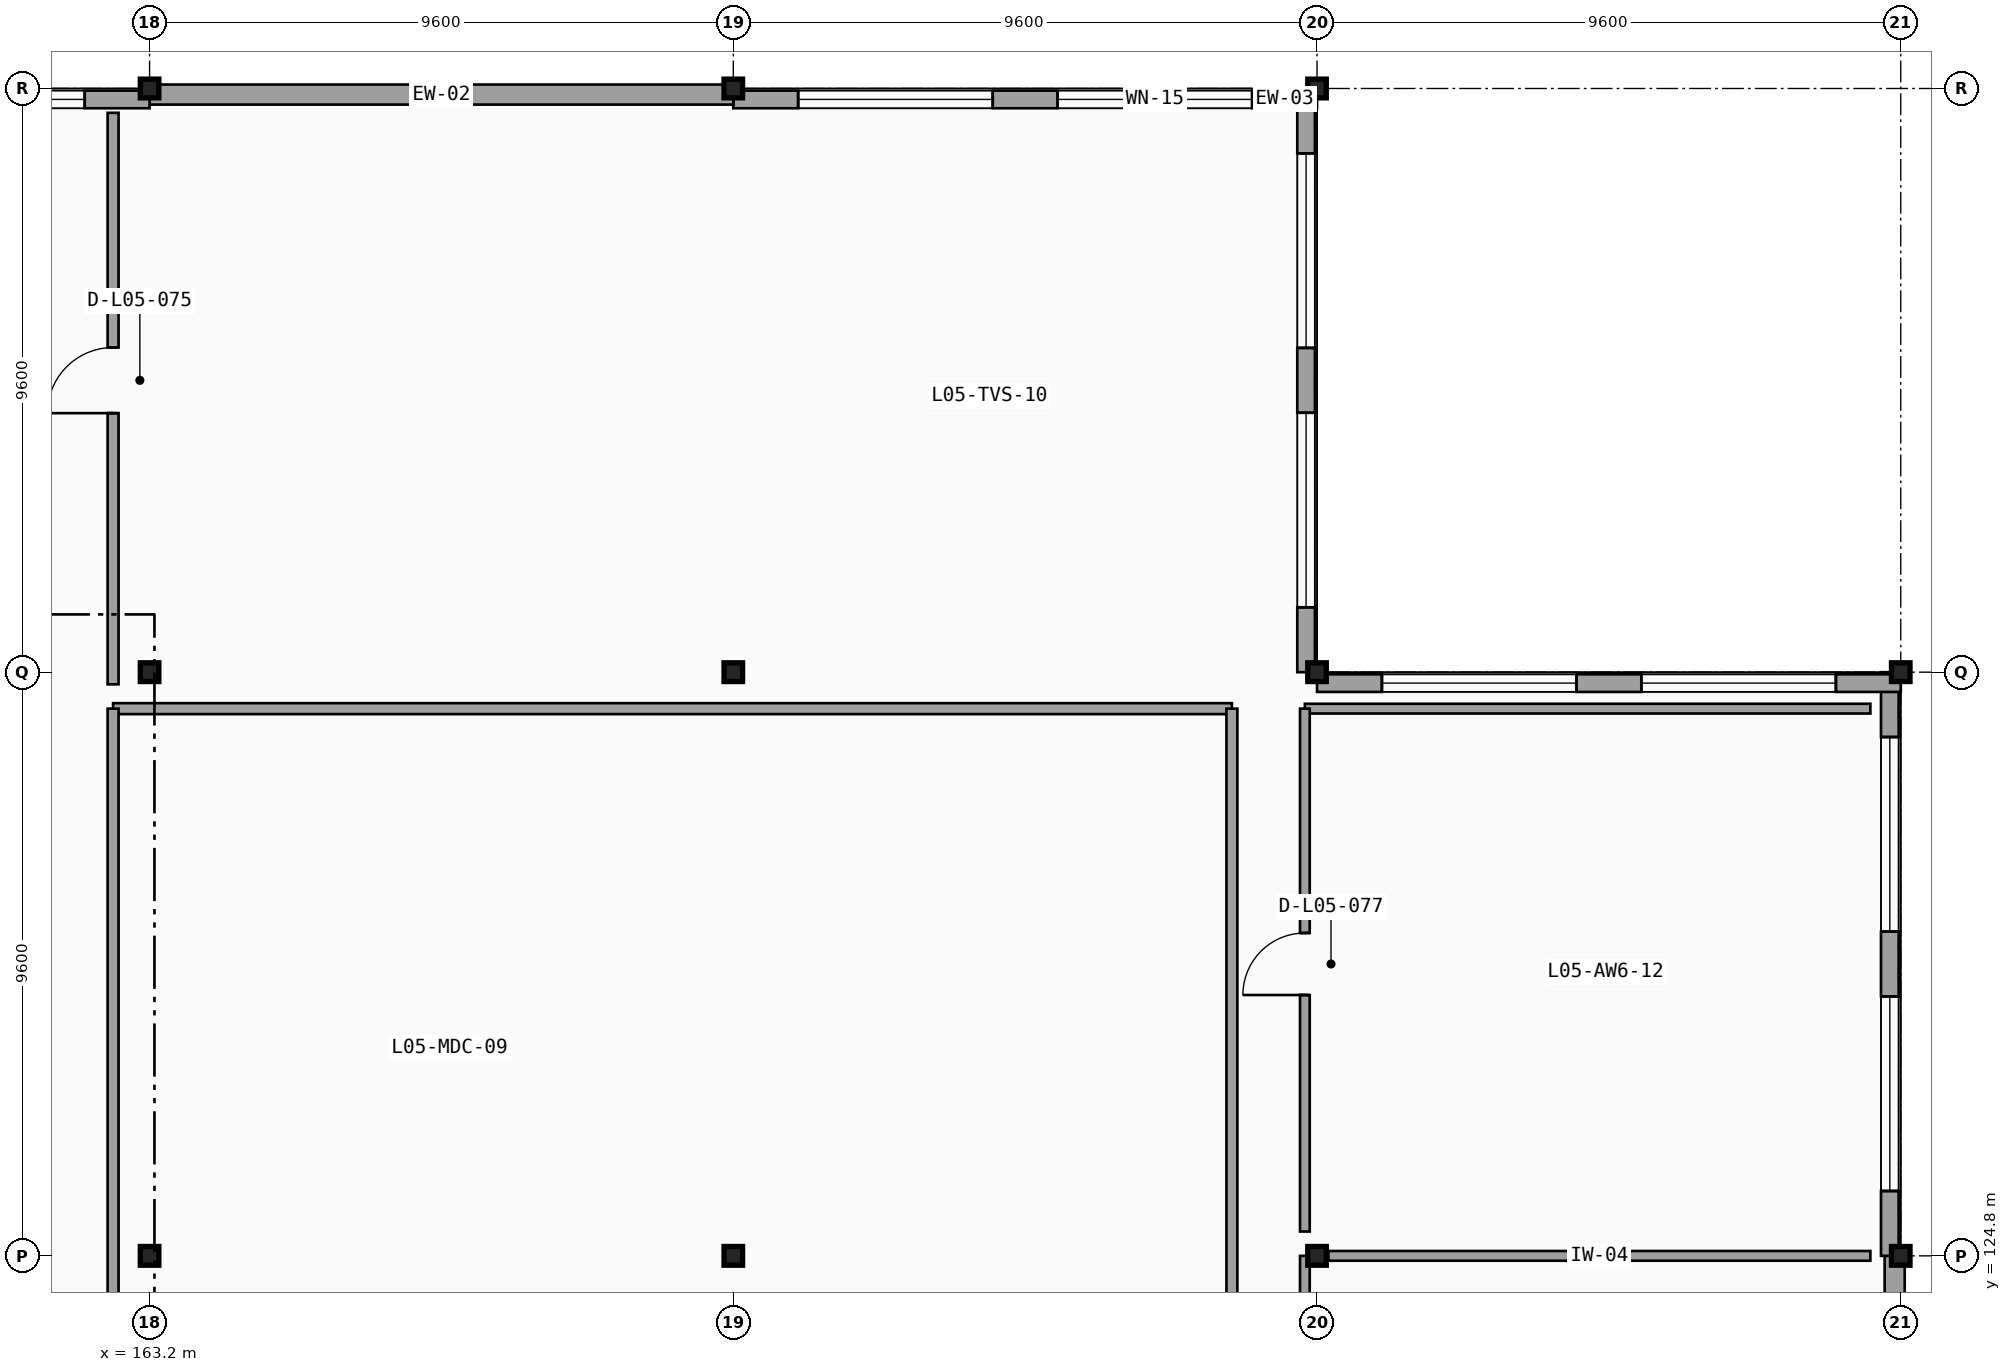
"""IFC4 building model, lengths in metres.
Left out: names, types, materials, properties, quantities, classifications, styles, units other than length and angle.
Written with IfcOpenShell. Run it as: python <this file> out.ifc"""

import sys

from ifc_helpers import new_model, si_unit, direction, frame, frame_2d, origin, origin_2d, place, context, subcontext, project, spatial, rectangle, i_section, extrude, element, fill, save


model = new_model("IFC4")
c1 = context("Model", 3, precision=1e-05, world=origin(), true_north=direction((0.0, 1.0)))
c2 = subcontext(c1, "Body", "Model", "MODEL_VIEW")
j1 = project(units=[si_unit("LENGTHUNIT", "METRE"), si_unit("PLANEANGLEUNIT", "RADIAN")], contexts=[c1])
p1 = place(None, origin())
s1 = spatial("IfcSite", under=j1, at=p1, CompositionType="ELEMENT")
p2 = place(p1, origin())
s2 = spatial("IfcBuilding", under=s1, at=p2, CompositionType="ELEMENT")
p3 = place(p2, frame((0.0, 0.0, 23.1)))
s3 = spatial("IfcBuildingStorey", under=s2, at=p3, CompositionType="ELEMENT", Elevation=23.1)
for number, where, z_axis, x_axis in (
    (1, (163.2, 124.8, 0.0), (0.0, 0.0, 1.0), (1.0, 0.0, 0.0)),
    (2, (163.2, 134.4, 0.0), (0.0, 0.0, 1.0), (1.0, 0.0, 0.0)),
    (3, (163.2, 144.0, 0.0), (0.0, 0.0, 1.0), (1.0, 0.0, 0.0)),
    (4, (172.8, 124.8, 0.0), (0.0, 0.0, 1.0), (1.0, 0.0, 0.0)),
    (5, (172.8, 134.4, 0.0), (0.0, 0.0, 1.0), (1.0, 0.0, 0.0)),
    (6, (172.8, 144.0, 0.0), (0.0, 0.0, 1.0), (1.0, 0.0, 0.0)),
    (7, (182.4, 124.8, 0.0), (0.0, 0.0, 1.0), (1.0, 0.0, 0.0)),
    (8, (182.4, 134.4, 0.0), (0.0, 0.0, 1.0), (1.0, 0.0, 0.0)),
    (9, (182.4, 144.0, 0.0), (0.0, 0.0, 1.0), (1.0, 0.0, 0.0)),
    (10, (192.0, 124.8, 0.0), (0.0, 0.0, 1.0), (1.0, 0.0, 0.0)),
    (11, (192.0, 134.4, 0.0), (0.0, 0.0, 1.0), (1.0, 0.0, 0.0)),
):
    element("IfcColumn", number, at=place(p3, frame(where, z_axis=z_axis, x_axis=x_axis)), inside=s3, PredefinedType="COLUMN", context=c2, shape_type="SweptSolid", body=[
        extrude(i_section(OverallWidth=0.305, OverallDepth=0.308, WebThickness=0.01, FlangeThickness=0.015, FilletRadius=0.013, at=origin_2d()), origin(), (0.0, 0.0, 1.0), 5.1),
    ])
p4 = place(p3, frame((182.4, 143.82, 0.0), z_axis=(0.0, 0.0, 1.0), x_axis=(-1.0, 0.0, 0.0)))
e12 = element("IfcWall", 12, at=p4, inside=s3, PredefinedType="SOLIDWALL", context=c2, shape_type="SweptSolid", body=[
    extrude(rectangle(XDim=9.6, YDim=0.29, at=frame_2d((4.8, 0.0))), origin(), (0.0, 0.0, 1.0), 3.906),
])
p5 = place(p4, frame((4.267, 0.0, 0.95), z_axis=(0.0, 0.0, 1.0), x_axis=(-1.0, 0.0, 0.0)))
e13 = element("IfcOpeningElement", 13, at=p5, cuts=e12, PredefinedType="OPENING", context=c2, shape_type="SweptSolid", body=[
    extrude(rectangle(XDim=3.2, YDim=2.2, at=frame_2d((1.6, 1.1))), frame((0.0, 0.155, 0.0), z_axis=(0.0, -1.0, 0.0), x_axis=(1.0, 0.0, 0.0)), (0.0, 0.0, 1.0), 0.31),
])
p6 = place(p4, frame((8.533, 0.0, 0.95), z_axis=(0.0, 0.0, 1.0), x_axis=(-1.0, 0.0, 0.0)))
e14 = element("IfcOpeningElement", 14, at=p6, cuts=e12, PredefinedType="OPENING", context=c2, shape_type="SweptSolid", body=[
    extrude(rectangle(XDim=3.2, YDim=2.2, at=frame_2d((1.6, 1.1))), frame((0.0, 0.155, 0.0), z_axis=(0.0, -1.0, 0.0), x_axis=(1.0, 0.0, 0.0)), (0.0, 0.0, 1.0), 0.31),
])
p7 = place(p3, frame((172.8, 143.9, 0.0), z_axis=(0.0, 0.0, 1.0), x_axis=(-1.0, 0.0, 0.0)))
e15 = element("IfcWall", 15, at=p7, inside=s3, PredefinedType="SOLIDWALL", context=c2, shape_type="SweptSolid", body=[
    extrude(rectangle(XDim=9.6, YDim=0.33, at=frame_2d((4.8, 0.0))), origin(), (0.0, 0.0, 1.0), 3.893),
])
p8 = place(p3, frame((163.2, 143.82, 0.0), z_axis=(0.0, 0.0, 1.0), x_axis=(-1.0, 0.0, 0.0)))
e16 = element("IfcWall", 16, at=p8, inside=s3, PredefinedType="SOLIDWALL", context=c2, shape_type="SweptSolid", body=[
    extrude(rectangle(XDim=9.6, YDim=0.29, at=frame_2d((4.8, 0.0))), origin(), (0.0, 0.0, 1.0), 3.893),
])
p9 = place(p8, frame((4.267, 0.0, 0.95), z_axis=(0.0, 0.0, 1.0), x_axis=(-1.0, 0.0, 0.0)))
e17 = element("IfcOpeningElement", 17, at=p9, cuts=e16, PredefinedType="OPENING", context=c2, shape_type="SweptSolid", body=[
    extrude(rectangle(XDim=3.2, YDim=2.2, at=frame_2d((1.6, 1.1))), frame((0.0, 0.155, 0.0), z_axis=(0.0, -1.0, 0.0), x_axis=(1.0, 0.0, 0.0)), (0.0, 0.0, 1.0), 0.31),
])
p10 = place(p8, frame((8.533, 0.0, 0.95), z_axis=(0.0, 0.0, 1.0), x_axis=(-1.0, 0.0, 0.0)))
e18 = element("IfcOpeningElement", 18, at=p10, cuts=e16, PredefinedType="OPENING", context=c2, shape_type="SweptSolid", body=[
    extrude(rectangle(XDim=3.2, YDim=2.2, at=frame_2d((1.6, 1.1))), frame((0.0, 0.155, 0.0), z_axis=(0.0, -1.0, 0.0), x_axis=(1.0, 0.0, 0.0)), (0.0, 0.0, 1.0), 0.31),
])
p11 = place(p3, frame((191.9, 115.2, 0.0), z_axis=(0.0, 0.0, 1.0), x_axis=(0.0, 1.0, 0.0)))
e19 = element("IfcWall", 19, at=p11, inside=s3, PredefinedType="SOLIDWALL", context=c2, shape_type="SweptSolid", body=[
    extrude(rectangle(XDim=9.6, YDim=0.33, at=frame_2d((4.8, 0.0))), origin(), (0.0, 0.0, 1.0), 3.893),
])
p12 = place(p3, frame((191.82, 124.8, 0.0), z_axis=(0.0, 0.0, 1.0), x_axis=(0.0, 1.0, 0.0)))
e20 = element("IfcWall", 20, at=p12, inside=s3, PredefinedType="SOLIDWALL", context=c2, shape_type="SweptSolid", body=[
    extrude(rectangle(XDim=9.6, YDim=0.29, at=frame_2d((4.8, 0.0))), origin(), (0.0, 0.0, 1.0), 3.906),
])
p13 = place(p12, frame((4.267, 0.0, 0.95), z_axis=(0.0, 0.0, 1.0), x_axis=(-1.0, 0.0, 0.0)))
e21 = element("IfcOpeningElement", 21, at=p13, cuts=e20, PredefinedType="OPENING", context=c2, shape_type="SweptSolid", body=[
    extrude(rectangle(XDim=3.2, YDim=2.2, at=frame_2d((1.6, 1.1))), frame((0.0, 0.155, 0.0), z_axis=(0.0, -1.0, 0.0), x_axis=(1.0, 0.0, 0.0)), (0.0, 0.0, 1.0), 0.31),
])
p14 = place(p12, frame((8.533, 0.0, 0.95), z_axis=(0.0, 0.0, 1.0), x_axis=(-1.0, 0.0, 0.0)))
e22 = element("IfcOpeningElement", 22, at=p14, cuts=e20, PredefinedType="OPENING", context=c2, shape_type="SweptSolid", body=[
    extrude(rectangle(XDim=3.2, YDim=2.2, at=frame_2d((1.6, 1.1))), frame((0.0, 0.155, 0.0), z_axis=(0.0, -1.0, 0.0), x_axis=(1.0, 0.0, 0.0)), (0.0, 0.0, 1.0), 0.31),
])
p15 = place(p3, frame((192.0, 134.22, 0.0), z_axis=(0.0, 0.0, 1.0), x_axis=(-1.0, 0.0, 0.0)))
e23 = element("IfcWall", 23, at=p15, inside=s3, PredefinedType="SOLIDWALL", context=c2, shape_type="SweptSolid", body=[
    extrude(rectangle(XDim=9.6, YDim=0.29, at=frame_2d((4.8, 0.0))), origin(), (0.0, 0.0, 1.0), 3.906),
])
p16 = place(p15, frame((4.267, 0.0, 0.95), z_axis=(0.0, 0.0, 1.0), x_axis=(-1.0, 0.0, 0.0)))
e24 = element("IfcOpeningElement", 24, at=p16, cuts=e23, PredefinedType="OPENING", context=c2, shape_type="SweptSolid", body=[
    extrude(rectangle(XDim=3.2, YDim=2.2, at=frame_2d((1.6, 1.1))), frame((0.0, 0.155, 0.0), z_axis=(0.0, -1.0, 0.0), x_axis=(1.0, 0.0, 0.0)), (0.0, 0.0, 1.0), 0.31),
])
p17 = place(p15, frame((8.533, 0.0, 0.95), z_axis=(0.0, 0.0, 1.0), x_axis=(-1.0, 0.0, 0.0)))
e25 = element("IfcOpeningElement", 25, at=p17, cuts=e23, PredefinedType="OPENING", context=c2, shape_type="SweptSolid", body=[
    extrude(rectangle(XDim=3.2, YDim=2.2, at=frame_2d((1.6, 1.1))), frame((0.0, 0.155, 0.0), z_axis=(0.0, -1.0, 0.0), x_axis=(1.0, 0.0, 0.0)), (0.0, 0.0, 1.0), 0.31),
])
p18 = place(p3, frame((182.22, 134.4, 0.0), z_axis=(0.0, 0.0, 1.0), x_axis=(0.0, 1.0, 0.0)))
e26 = element("IfcWall", 26, at=p18, inside=s3, PredefinedType="SOLIDWALL", context=c2, shape_type="SweptSolid", body=[
    extrude(rectangle(XDim=9.6, YDim=0.29, at=frame_2d((4.8, 0.0))), origin(), (0.0, 0.0, 1.0), 3.906),
])
p19 = place(p18, frame((4.267, 0.0, 0.95), z_axis=(0.0, 0.0, 1.0), x_axis=(-1.0, 0.0, 0.0)))
e27 = element("IfcOpeningElement", 27, at=p19, cuts=e26, PredefinedType="OPENING", context=c2, shape_type="SweptSolid", body=[
    extrude(rectangle(XDim=3.2, YDim=2.2, at=frame_2d((1.6, 1.1))), frame((0.0, 0.155, 0.0), z_axis=(0.0, -1.0, 0.0), x_axis=(1.0, 0.0, 0.0)), (0.0, 0.0, 1.0), 0.31),
])
p20 = place(p18, frame((8.533, 0.0, 0.95), z_axis=(0.0, 0.0, 1.0), x_axis=(-1.0, 0.0, 0.0)))
e28 = element("IfcOpeningElement", 28, at=p20, cuts=e26, PredefinedType="OPENING", context=c2, shape_type="SweptSolid", body=[
    extrude(rectangle(XDim=3.2, YDim=2.2, at=frame_2d((1.6, 1.1))), frame((0.0, 0.155, 0.0), z_axis=(0.0, -1.0, 0.0), x_axis=(1.0, 0.0, 0.0)), (0.0, 0.0, 1.0), 0.31),
])
p21 = place(p3, frame((162.6, 133.8, 0.0), z_axis=(0.0, 0.0, 1.0), x_axis=(1.0, 0.0, 0.0)))
e29 = element("IfcWall", 29, at=p21, inside=s3, PredefinedType="PARTITIONING", context=c2, shape_type="SweptSolid", body=[
    extrude(rectangle(XDim=18.4, YDim=0.18, at=frame_2d((9.2, 0.0))), origin(), (0.0, 0.0, 1.0), 3.893),
])
for number, where, z_axis, x_axis in (
    (30, (181.0, 133.8, 0.0), (0.0, 0.0, 1.0), (0.0, -1.0, 0.0)),
    (31, (162.6, 121.4, 0.0), (0.0, 0.0, 1.0), (0.0, 1.0, 0.0)),
):
    element("IfcWall", number, at=place(p3, frame(where, z_axis=z_axis, x_axis=x_axis)), inside=s3, PredefinedType="PARTITIONING", context=c2, shape_type="SweptSolid", body=[
        extrude(rectangle(XDim=12.4, YDim=0.18, at=frame_2d((6.2, 0.0))), origin(), (0.0, 0.0, 1.0), 3.906),
    ])
p22 = place(p3, frame((162.6, 134.2, 0.0), z_axis=(0.0, 0.0, 1.0), x_axis=(0.0, 1.0, 0.0)))
e32 = element("IfcWall", 32, at=p22, inside=s3, PredefinedType="PARTITIONING", context=c2, shape_type="SweptSolid", body=[
    extrude(rectangle(XDim=9.4, YDim=0.18, at=frame_2d((4.7, 0.0))), origin(), (0.0, 0.0, 1.0), 3.906),
])
p23 = place(p22, frame((4.46, 0.0, 0.0), z_axis=(0.0, 0.0, 1.0), x_axis=(1.0, 0.0, 0.0)))
e33 = element("IfcOpeningElement", 33, at=p23, cuts=e32, PredefinedType="OPENING", context=c2, shape_type="SweptSolid", body=[
    extrude(rectangle(XDim=1.08, YDim=2.22, at=frame_2d((0.54, 1.11))), frame((0.0, 0.1, 0.0), z_axis=(0.0, -1.0, 0.0), x_axis=(1.0, 0.0, 0.0)), (0.0, 0.0, 1.0), 0.2),
])
p24 = place(p3, frame((182.587, 124.8, 0.0), z_axis=(0.0, 0.0, 1.0), x_axis=(1.0, 0.0, 0.0)))
e34 = element("IfcWall", 34, at=p24, inside=s3, PredefinedType="PARTITIONING", context=c2, shape_type="SweptSolid", body=[
    extrude(rectangle(XDim=8.913, YDim=0.16, at=frame_2d((4.456, 0.0))), origin(), (0.0, 0.0, 1.0), 3.906),
])
p25 = place(p3, frame((182.2, 116.0, 0.0), z_axis=(0.0, 0.0, 1.0), x_axis=(0.0, 1.0, 0.0)))
e35 = element("IfcWall", 35, at=p25, inside=s3, PredefinedType="PARTITIONING", context=c2, shape_type="SweptSolid", body=[
    extrude(rectangle(XDim=8.8, YDim=0.16, at=frame_2d((4.4, 0.0))), origin(), (0.0, 0.0, 1.0), 3.906),
])
p26 = place(p25, frame((3.54, 0.0, 0.0), z_axis=(0.0, 0.0, 1.0), x_axis=(1.0, 0.0, 0.0)))
e36 = element("IfcOpeningElement", 36, at=p26, cuts=e35, PredefinedType="OPENING", context=c2, shape_type="SweptSolid", body=[
    extrude(rectangle(XDim=0.92, YDim=2.12, at=frame_2d((0.46, 1.06))), frame((0.0, 0.09, 0.0), z_axis=(0.0, -1.0, 0.0), x_axis=(1.0, 0.0, 0.0)), (0.0, 0.0, 1.0), 0.18),
])
p27 = place(p3, frame((182.2, 133.8, 0.0), z_axis=(0.0, 0.0, 1.0), x_axis=(1.0, 0.0, 0.0)))
e37 = element("IfcWall", 37, at=p27, inside=s3, PredefinedType="PARTITIONING", context=c2, shape_type="SweptSolid", body=[
    extrude(rectangle(XDim=9.3, YDim=0.16, at=frame_2d((4.65, 0.0))), origin(), (0.0, 0.0, 1.0), 3.906),
])
p28 = place(p3, frame((182.2, 125.2, 0.0), z_axis=(0.0, 0.0, 1.0), x_axis=(0.0, 1.0, 0.0)))
e38 = element("IfcWall", 38, at=p28, inside=s3, PredefinedType="PARTITIONING", context=c2, shape_type="SweptSolid", body=[
    extrude(rectangle(XDim=8.6, YDim=0.16, at=frame_2d((4.3, 0.0))), origin(), (0.0, 0.0, 1.0), 3.906),
])
p29 = place(p28, frame((3.89, 0.0, 0.0), z_axis=(0.0, 0.0, 1.0), x_axis=(1.0, 0.0, 0.0)))
e39 = element("IfcOpeningElement", 39, at=p29, cuts=e38, PredefinedType="OPENING", context=c2, shape_type="SweptSolid", body=[
    extrude(rectangle(XDim=1.02, YDim=2.15, at=frame_2d((0.51, 1.075))), frame((0.0, 0.09, 0.0), z_axis=(0.0, -1.0, 0.0), x_axis=(1.0, 0.0, 0.0)), (0.0, 0.0, 1.0), 0.18),
])
p30 = place(p5, origin())
e40 = element("IfcWindow", 40, at=p30, inside=s3, PartitioningType="SINGLE_PANEL", PredefinedType="WINDOW", context=c2, shape_type="SweptSolid", body=[
    extrude(rectangle(XDim=3.2, YDim=2.2, at=frame_2d((1.6, 1.1))), frame((0.0, 0.03, 0.0), z_axis=(0.0, -1.0, 0.0), x_axis=(1.0, 0.0, 0.0)), (0.0, 0.0, 1.0), 0.06),
])
fill(e13, e40)
p31 = place(p6, origin())
e41 = element("IfcWindow", 41, at=p31, inside=s3, PartitioningType="SINGLE_PANEL", PredefinedType="WINDOW", context=c2, shape_type="SweptSolid", body=[
    extrude(rectangle(XDim=3.2, YDim=2.2, at=frame_2d((1.6, 1.1))), frame((0.0, 0.03, 0.0), z_axis=(0.0, -1.0, 0.0), x_axis=(1.0, 0.0, 0.0)), (0.0, 0.0, 1.0), 0.06),
])
fill(e14, e41)
p32 = place(p9, origin())
e42 = element("IfcWindow", 42, at=p32, inside=s3, PartitioningType="SINGLE_PANEL", PredefinedType="WINDOW", context=c2, shape_type="SweptSolid", body=[
    extrude(rectangle(XDim=3.2, YDim=2.2, at=frame_2d((1.6, 1.1))), frame((0.0, 0.03, 0.0), z_axis=(0.0, -1.0, 0.0), x_axis=(1.0, 0.0, 0.0)), (0.0, 0.0, 1.0), 0.06),
])
fill(e17, e42)
p33 = place(p13, origin())
e43 = element("IfcWindow", 43, at=p33, inside=s3, PartitioningType="SINGLE_PANEL", PredefinedType="WINDOW", context=c2, shape_type="SweptSolid", body=[
    extrude(rectangle(XDim=3.2, YDim=2.2, at=frame_2d((1.6, 1.1))), frame((0.0, 0.03, 0.0), z_axis=(0.0, -1.0, 0.0), x_axis=(1.0, 0.0, 0.0)), (0.0, 0.0, 1.0), 0.06),
])
fill(e21, e43)
p34 = place(p14, origin())
e44 = element("IfcWindow", 44, at=p34, inside=s3, PartitioningType="SINGLE_PANEL", PredefinedType="WINDOW", context=c2, shape_type="SweptSolid", body=[
    extrude(rectangle(XDim=3.2, YDim=2.2, at=frame_2d((1.6, 1.1))), frame((0.0, 0.03, 0.0), z_axis=(0.0, -1.0, 0.0), x_axis=(1.0, 0.0, 0.0)), (0.0, 0.0, 1.0), 0.06),
])
fill(e22, e44)
p35 = place(p16, origin())
e45 = element("IfcWindow", 45, at=p35, inside=s3, PartitioningType="SINGLE_PANEL", PredefinedType="WINDOW", context=c2, shape_type="SweptSolid", body=[
    extrude(rectangle(XDim=3.2, YDim=2.2, at=frame_2d((1.6, 1.1))), frame((0.0, 0.03, 0.0), z_axis=(0.0, -1.0, 0.0), x_axis=(1.0, 0.0, 0.0)), (0.0, 0.0, 1.0), 0.06),
])
fill(e24, e45)
p36 = place(p17, origin())
e46 = element("IfcWindow", 46, at=p36, inside=s3, PartitioningType="SINGLE_PANEL", PredefinedType="WINDOW", context=c2, shape_type="SweptSolid", body=[
    extrude(rectangle(XDim=3.2, YDim=2.2, at=frame_2d((1.6, 1.1))), frame((0.0, 0.03, 0.0), z_axis=(0.0, -1.0, 0.0), x_axis=(1.0, 0.0, 0.0)), (0.0, 0.0, 1.0), 0.06),
])
fill(e25, e46)
p37 = place(p19, origin())
e47 = element("IfcWindow", 47, at=p37, inside=s3, PartitioningType="SINGLE_PANEL", PredefinedType="WINDOW", context=c2, shape_type="SweptSolid", body=[
    extrude(rectangle(XDim=3.2, YDim=2.2, at=frame_2d((1.6, 1.1))), frame((0.0, 0.03, 0.0), z_axis=(0.0, -1.0, 0.0), x_axis=(1.0, 0.0, 0.0)), (0.0, 0.0, 1.0), 0.06),
])
fill(e27, e47)
p38 = place(p20, origin())
e48 = element("IfcWindow", 48, at=p38, inside=s3, PartitioningType="SINGLE_PANEL", PredefinedType="WINDOW", context=c2, shape_type="SweptSolid", body=[
    extrude(rectangle(XDim=3.2, YDim=2.2, at=frame_2d((1.6, 1.1))), frame((0.0, 0.03, 0.0), z_axis=(0.0, -1.0, 0.0), x_axis=(1.0, 0.0, 0.0)), (0.0, 0.0, 1.0), 0.06),
])
fill(e28, e48)
p39 = place(p23, origin())
e49 = element("IfcDoor", 49, at=p39, inside=s3, OperationType="SINGLE_SWING_LEFT", PredefinedType="DOOR", context=c2, shape_type="SweptSolid", body=[
    extrude(rectangle(XDim=1.08, YDim=2.22, at=frame_2d((0.54, 1.11))), frame((0.0, 0.025, 0.0), z_axis=(0.0, -1.0, 0.0), x_axis=(1.0, 0.0, 0.0)), (0.0, 0.0, 1.0), 0.05),
])
fill(e33, e49)
p40 = place(p29, origin())
e50 = element("IfcDoor", 50, at=p40, inside=s3, OperationType="SINGLE_SWING_LEFT", PredefinedType="DOOR", context=c2, shape_type="SweptSolid", body=[
    extrude(rectangle(XDim=1.02, YDim=2.15, at=frame_2d((0.51, 1.075))), frame((0.0, 0.025, 0.0), z_axis=(0.0, -1.0, 0.0), x_axis=(1.0, 0.0, 0.0)), (0.0, 0.0, 1.0), 0.05),
])
fill(e39, e50)
save(model, sys.argv[1])
